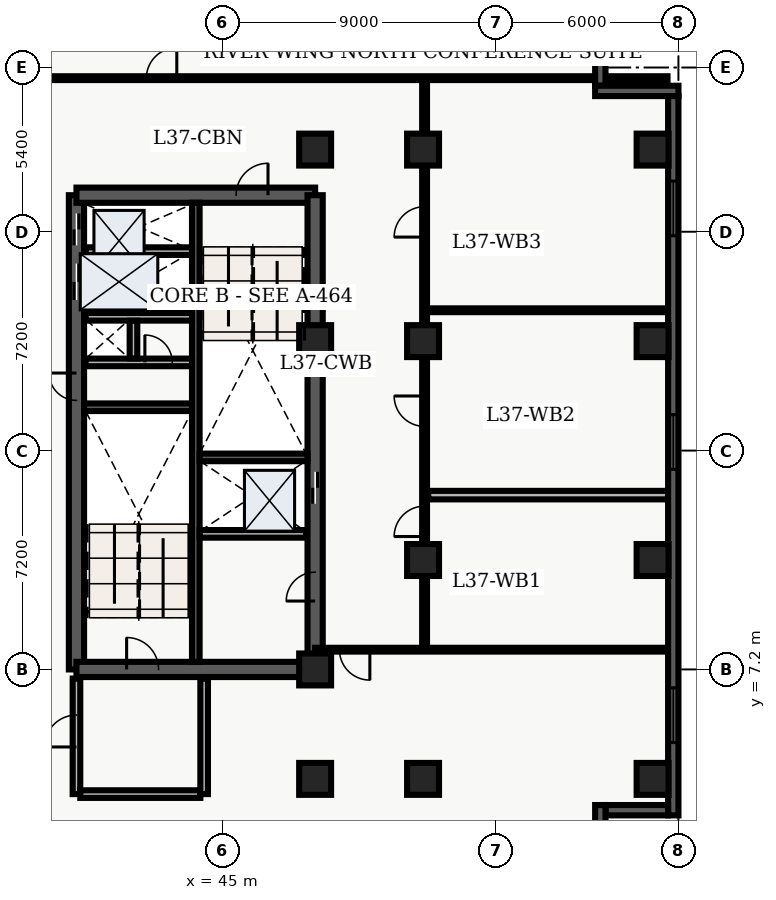
"""IFC4 building model, lengths in metres.
Left out: names, types, materials, properties, quantities, classifications, styles, units other than length and angle.
Written with IfcOpenShell. Run it as: python <this file> out.ifc"""

import sys

from ifc_helpers import new_model, entity, si_unit, converted_unit, direction, frame, origin_with_axes, origin_2d_with_axis, place, context, subcontext, project, spatial, polyline, rectangle, outline, extrude, element, fill, save


model = new_model("IFC4")
c1 = context("Model", 3, precision=1e-05, world=origin_with_axes(), true_north=direction((0.0, 1.0)))
c2 = subcontext(c1, "Body", "Model", "MODEL_VIEW")
j1 = project(units=[si_unit("LENGTHUNIT", "METRE"), converted_unit("PLANEANGLEUNIT", "DEGREE", entity("IfcPlaneAngleMeasure", 0.017), si_unit("PLANEANGLEUNIT", "RADIAN"), dimensions=[0, 0, 0, 0, 0, 0, 0])], contexts=[c1])
p1 = place(None, origin_with_axes())
s1 = spatial("IfcSite", under=j1, at=p1, CompositionType="ELEMENT")
p2 = place(p1, origin_with_axes())
s2 = spatial("IfcBuilding", under=s1, at=p2, CompositionType="ELEMENT")
p3 = place(p2, frame((0.0, 0.0, 152.4), z_axis=(0.0, 0.0, 1.0), x_axis=(1.0, 0.0, 0.0)))
s3 = spatial("IfcBuildingStorey", under=s2, at=p3, CompositionType="ELEMENT", Elevation=152.4)
p4 = place(p3, frame((40.2, 7.2, 0.0), z_axis=(0.0, 0.0, 1.0), x_axis=(0.0, 1.0, 0.0)))
e1 = element("IfcWall", 1, at=p4, inside=s3, PredefinedType="SHEAR", context=c2, shape_type="SweptSolid", body=[
    extrude(outline(polyline([(0.0, -0.25), (15.6, -0.25), (15.6, 0.25), (0.0, 0.25), (0.0, -0.25)])), origin_with_axes(), (0.0, 0.0, 1.0), 3.66),
])
p5 = place(p4, frame((14.475, 0.0, 0.0), z_axis=(0.0, 0.0, 1.0), x_axis=(1.0, 0.0, 0.0)))
e2 = element("IfcOpeningElement", 2, at=p5, cuts=e1, PredefinedType="OPENING", context=c2, shape_type="SweptSolid", body=[
    extrude(rectangle(XDim=1.05, YDim=0.52, at=origin_2d_with_axis()), origin_with_axes(), (0.0, 0.0, 1.0), 2.15),
])
p6 = place(p4, frame((12.75, 0.0, 0.0), z_axis=(0.0, 0.0, 1.0), x_axis=(1.0, 0.0, 0.0)))
e3 = element("IfcOpeningElement", 3, at=p6, cuts=e1, PredefinedType="OPENING", context=c2, shape_type="SweptSolid", body=[
    extrude(rectangle(XDim=1.2, YDim=0.52, at=origin_2d_with_axis()), origin_with_axes(), (0.0, 0.0, 1.0), 2.15),
])
p7 = place(p4, frame((9.3, 0.0, 0.0), z_axis=(0.0, 0.0, 1.0), x_axis=(1.0, 0.0, 0.0)))
e4 = element("IfcOpeningElement", 4, at=p7, cuts=e1, PredefinedType="OPENING", context=c2, shape_type="SweptSolid", body=[
    extrude(rectangle(XDim=0.9, YDim=0.52, at=origin_2d_with_axis()), origin_with_axes(), (0.0, 0.0, 1.0), 2.15),
])
p8 = place(p3, frame((40.2, 7.2, 0.0), z_axis=(0.0, 0.0, 1.0), x_axis=(1.0, 0.0, 0.0)))
e5 = element("IfcWall", 5, at=p8, inside=s3, PredefinedType="SHEAR", context=c2, shape_type="SweptSolid", body=[
    extrude(outline(polyline([(0.0, -0.25), (7.85, -0.25), (7.85, 0.25), (0.0, 0.25), (0.0, -0.25)])), origin_with_axes(), (0.0, 0.0, 1.0), 3.66),
])
p9 = place(p8, frame((2.175, 0.0, 0.0), z_axis=(0.0, 0.0, 1.0), x_axis=(1.0, 0.0, 0.0)))
e6 = element("IfcOpeningElement", 6, at=p9, cuts=e5, PredefinedType="OPENING", context=c2, shape_type="SweptSolid", body=[
    extrude(rectangle(XDim=1.05, YDim=0.52, at=origin_2d_with_axis()), origin_with_axes(), (0.0, 0.0, 1.0), 2.15),
])
p10 = place(p3, frame((40.2, 22.8, 0.0), z_axis=(0.0, 0.0, 1.0), x_axis=(1.0, 0.0, 0.0)))
e7 = element("IfcWall", 7, at=p10, inside=s3, PredefinedType="SHEAR", context=c2, shape_type="SweptSolid", body=[
    extrude(outline(polyline([(0.0, -0.25), (7.85, -0.25), (7.85, 0.25), (0.0, 0.25), (0.0, -0.25)])), origin_with_axes(), (0.0, 0.0, 1.0), 3.66),
])
p11 = place(p10, frame((5.775, 0.0, 0.0), z_axis=(0.0, 0.0, 1.0), x_axis=(1.0, 0.0, 0.0)))
e8 = element("IfcOpeningElement", 8, at=p11, cuts=e7, PredefinedType="OPENING", context=c2, shape_type="SweptSolid", body=[
    extrude(rectangle(XDim=1.05, YDim=0.52, at=origin_2d_with_axis()), origin_with_axes(), (0.0, 0.0, 1.0), 2.15),
])
p12 = place(p3, frame((48.05, 7.2, 0.0), z_axis=(0.0, 0.0, 1.0), x_axis=(0.0, 1.0, 0.0)))
e9 = element("IfcWall", 9, at=p12, inside=s3, PredefinedType="SHEAR", context=c2, shape_type="SweptSolid", body=[
    extrude(outline(polyline([(0.0, -0.25), (15.6, -0.25), (15.6, 0.25), (0.0, 0.25), (0.0, -0.25)])), origin_with_axes(), (0.0, 0.0, 1.0), 3.66),
])
p13 = place(p12, frame((5.975, 0.0, 0.0), z_axis=(0.0, 0.0, 1.0), x_axis=(1.0, 0.0, 0.0)))
e10 = element("IfcOpeningElement", 10, at=p13, cuts=e9, PredefinedType="OPENING", context=c2, shape_type="SweptSolid", body=[
    extrude(rectangle(XDim=1.05, YDim=0.52, at=origin_2d_with_axis()), origin_with_axes(), (0.0, 0.0, 1.0), 2.15),
])
p14 = place(p12, frame((2.725, 0.0, 0.0), z_axis=(0.0, 0.0, 1.0), x_axis=(1.0, 0.0, 0.0)))
e11 = element("IfcOpeningElement", 11, at=p14, cuts=e9, PredefinedType="OPENING", context=c2, shape_type="SweptSolid", body=[
    extrude(rectangle(XDim=0.95, YDim=0.52, at=origin_2d_with_axis()), origin_with_axes(), (0.0, 0.0, 1.0), 2.15),
])
p15 = place(p3, frame((44.125, 7.45, 0.0), z_axis=(0.0, 0.0, 1.0), x_axis=(0.0, 1.0, 0.0)))
e12 = element("IfcWall", 12, at=p15, inside=s3, PredefinedType="SHEAR", context=c2, shape_type="SweptSolid", body=[
    extrude(outline(polyline([(0.0, -0.125), (15.1, -0.125), (15.1, 0.125), (0.0, 0.125), (0.0, -0.125)])), origin_with_axes(), (0.0, 0.0, 1.0), 3.66),
])
for number, where, z_axis, x_axis in (
    (13, (40.45, 15.825, 0.0), (0.0, 0.0, 1.0), (1.0, 0.0, 0.0)),
    (14, (44.25, 14.175, 0.0), (0.0, 0.0, 1.0), (1.0, 0.0, 0.0)),
):
    element("IfcWall", number, at=place(p3, frame(where, z_axis=z_axis, x_axis=x_axis)), inside=s3, PredefinedType="SHEAR", context=c2, shape_type="SweptSolid", body=[
        extrude(outline(polyline([(0.0, -0.125), (3.55, -0.125), (3.55, 0.125), (0.0, 0.125), (0.0, -0.125)])), origin_with_axes(), (0.0, 0.0, 1.0), 3.66),
    ])
p16 = place(p3, frame((40.5, 17.3, 0.0), z_axis=(0.0, 0.0, 1.0), x_axis=(1.0, 0.0, 0.0)))
e15 = element("IfcWall", 15, at=p16, inside=s3, PredefinedType="SOLIDWALL", context=c2, shape_type="SweptSolid", body=[
    extrude(outline(polyline([(0.0, -0.125), (3.5, -0.125), (3.5, 0.125), (0.0, 0.125), (0.0, -0.125)])), origin_with_axes(), (0.0, 0.0, 1.0), 2.7),
])
p17 = place(p16, frame((2.4, 0.0, 0.0), z_axis=(0.0, 0.0, 1.0), x_axis=(1.0, 0.0, 0.0)))
e16 = element("IfcOpeningElement", 16, at=p17, cuts=e15, PredefinedType="OPENING", context=c2, shape_type="SweptSolid", body=[
    extrude(rectangle(XDim=0.9, YDim=0.27, at=origin_2d_with_axis()), origin_with_axes(), (0.0, 0.0, 1.0), 2.15),
])
p18 = place(p3, frame((40.5, 18.8, 0.0), z_axis=(0.0, 0.0, 1.0), x_axis=(1.0, 0.0, 0.0)))
e17 = element("IfcWall", 17, at=p18, inside=s3, PredefinedType="SOLIDWALL", context=c2, shape_type="SweptSolid", body=[
    extrude(outline(polyline([(0.0, -0.125), (3.5, -0.125), (3.5, 0.125), (0.0, 0.125), (0.0, -0.125)])), origin_with_axes(), (0.0, 0.0, 1.0), 2.7),
])
p19 = place(p3, frame((42.075, 17.43, 0.0), z_axis=(0.0, 0.0, 1.0), x_axis=(0.0, 1.0, 0.0)))
e18 = element("IfcWall", 18, at=p19, inside=s3, PredefinedType="SOLIDWALL", context=c2, shape_type="SweptSolid", body=[
    extrude(outline(polyline([(0.0, -0.125), (1.24, -0.125), (1.24, 0.125), (0.0, 0.125), (0.0, -0.125)])), origin_with_axes(), (0.0, 0.0, 1.0), 2.7),
])
p20 = place(p3, frame((40.2, 3.1, 0.0), z_axis=(0.0, 0.0, 1.0), x_axis=(0.0, 1.0, 0.0)))
e19 = element("IfcWall", 19, at=p20, inside=s3, PredefinedType="SOLIDWALL", context=c2, shape_type="SweptSolid", body=[
    extrude(outline(polyline([(0.0, -0.125), (3.8, -0.125), (3.8, 0.125), (0.0, 0.125), (0.0, -0.125)])), origin_with_axes(), (0.0, 0.0, 1.0), 2.7),
])
p21 = place(p20, frame((2.075, 0.0, 0.0), z_axis=(0.0, 0.0, 1.0), x_axis=(1.0, 0.0, 0.0)))
e20 = element("IfcOpeningElement", 20, at=p21, cuts=e19, PredefinedType="OPENING", context=c2, shape_type="SweptSolid", body=[
    extrude(rectangle(XDim=1.05, YDim=0.27, at=origin_2d_with_axis()), origin_with_axes(), (0.0, 0.0, 1.0), 2.15),
])
p22 = place(p3, frame((40.325, 3.1, 0.0), z_axis=(0.0, 0.0, 1.0), x_axis=(1.0, 0.0, 0.0)))
e21 = element("IfcWall", 21, at=p22, inside=s3, PredefinedType="SOLIDWALL", context=c2, shape_type="SweptSolid", body=[
    extrude(outline(polyline([(0.0, -0.125), (3.95, -0.125), (3.95, 0.125), (0.0, 0.125), (0.0, -0.125)])), origin_with_axes(), (0.0, 0.0, 1.0), 2.7),
])
p23 = place(p3, frame((44.4, 3.1, 0.0), z_axis=(0.0, 0.0, 1.0), x_axis=(0.0, 1.0, 0.0)))
e22 = element("IfcWall", 22, at=p23, inside=s3, PredefinedType="SOLIDWALL", context=c2, shape_type="SweptSolid", body=[
    extrude(outline(polyline([(0.0, -0.125), (3.8, -0.125), (3.8, 0.125), (0.0, 0.125), (0.0, -0.125)])), origin_with_axes(), (0.0, 0.0, 1.0), 2.7),
])
for number, where, z_axis, x_axis in (
    (23, (48.05, 3.6, 0.0), (0.0, 0.0, 1.0), (1.0, 0.0, 0.0)),
    (24, (48.05, 7.2, 0.0), (0.0, 0.0, 1.0), (1.0, 0.0, 0.0)),
    (25, (48.05, 18.0, 0.0), (0.0, 0.0, 1.0), (1.0, 0.0, 0.0)),
    (26, (48.05, 24.3, 0.0), (0.0, 0.0, 1.0), (1.0, 0.0, 0.0)),
    (27, (51.6, 3.6, 0.0), (0.0, 0.0, 1.0), (1.0, 0.0, 0.0)),
    (28, (51.6, 10.8, 0.0), (0.0, 0.0, 1.0), (1.0, 0.0, 0.0)),
    (29, (51.6, 18.0, 0.0), (0.0, 0.0, 1.0), (1.0, 0.0, 0.0)),
    (30, (51.6, 24.3, 0.0), (0.0, 0.0, 1.0), (1.0, 0.0, 0.0)),
    (31, (59.15, 3.6, 0.0), (0.0, 0.0, 1.0), (1.0, 0.0, 0.0)),
    (32, (59.15, 10.8, 0.0), (0.0, 0.0, 1.0), (1.0, 0.0, 0.0)),
    (33, (59.15, 18.0, 0.0), (0.0, 0.0, 1.0), (1.0, 0.0, 0.0)),
    (34, (59.15, 24.3, 0.0), (0.0, 0.0, 1.0), (1.0, 0.0, 0.0)),
):
    element("IfcColumn", number, at=place(p3, frame(where, z_axis=z_axis, x_axis=x_axis)), inside=s3, PredefinedType="COLUMN", context=c2, shape_type="SweptSolid", body=[
        extrude(rectangle(XDim=1.05, YDim=1.05, at=origin_2d_with_axis()), origin_with_axes(), (0.0, 0.0, 1.0), 3.9),
    ])
for number, where, z_axis, x_axis in (
    (35, (40.5, 20.96, 0.0), (0.0, 0.0, 1.0), (1.0, 0.0, 0.0)),
    (36, (44.25, 11.66, 0.0), (0.0, 0.0, 1.0), (1.0, 0.0, 0.0)),
):
    element("IfcWall", number, at=place(p3, frame(where, z_axis=z_axis, x_axis=x_axis)), inside=s3, PredefinedType="SOLIDWALL", context=c2, shape_type="SweptSolid", body=[
        extrude(outline(polyline([(0.0, -0.125), (3.5, -0.125), (3.5, 0.125), (0.0, 0.125), (0.0, -0.125)])), origin_with_axes(), (0.0, 0.0, 1.0), 2.7),
    ])
p24 = place(p3, frame((51.65, 7.85, 0.0), z_axis=(0.0, 0.0, 1.0), x_axis=(0.0, 1.0, 0.0)))
e37 = element("IfcWall", 37, at=p24, inside=s3, PredefinedType="PARTITIONING", context=c2, shape_type="SweptSolid", body=[
    extrude(outline(polyline([(0.0, -0.08), (18.8, -0.08), (18.8, 0.08), (0.0, 0.08), (0.0, -0.08)])), origin_with_axes(), (0.0, 0.0, 1.0), 2.7),
])
p25 = place(p24, frame((4.222, 0.0, 0.0), z_axis=(0.0, 0.0, 1.0), x_axis=(1.0, 0.0, 0.0)))
e38 = element("IfcOpeningElement", 38, at=p25, cuts=e37, PredefinedType="OPENING", context=c2, shape_type="SweptSolid", body=[
    extrude(rectangle(XDim=1.0, YDim=0.18, at=origin_2d_with_axis()), origin_with_axes(), (0.0, 0.0, 1.0), 2.15),
])
p26 = place(p24, frame((7.845, 0.0, 0.0), z_axis=(0.0, 0.0, 1.0), x_axis=(1.0, 0.0, 0.0)))
e39 = element("IfcOpeningElement", 39, at=p26, cuts=e37, PredefinedType="OPENING", context=c2, shape_type="SweptSolid", body=[
    extrude(rectangle(XDim=1.0, YDim=0.18, at=origin_2d_with_axis()), origin_with_axes(), (0.0, 0.0, 1.0), 2.15),
])
p27 = place(p24, frame((14.072, 0.0, 0.0), z_axis=(0.0, 0.0, 1.0), x_axis=(1.0, 0.0, 0.0)))
e40 = element("IfcOpeningElement", 40, at=p27, cuts=e37, PredefinedType="OPENING", context=c2, shape_type="SweptSolid", body=[
    extrude(rectangle(XDim=1.0, YDim=0.18, at=origin_2d_with_axis()), origin_with_axes(), (0.0, 0.0, 1.0), 2.15),
])
p28 = place(p3, frame((59.665, 7.85, 0.0), z_axis=(0.0, 0.0, 1.0), x_axis=(-1.0, 0.0, 0.0)))
e41 = element("IfcWall", 41, at=p28, inside=s3, PredefinedType="PARTITIONING", context=c2, shape_type="SweptSolid", body=[
    extrude(outline(polyline([(0.0, -0.062), (11.615, -0.062), (11.615, 0.062), (0.0, 0.062), (0.0, -0.062)])), origin_with_axes(), (0.0, 0.0, 1.0), 2.7),
])
p29 = place(p28, frame((10.315, 0.0, 0.0), z_axis=(0.0, 0.0, 1.0), x_axis=(1.0, 0.0, 0.0)))
e42 = element("IfcOpeningElement", 42, at=p29, cuts=e41, PredefinedType="OPENING", context=c2, shape_type="SweptSolid", body=[
    extrude(rectangle(XDim=1.0, YDim=0.145, at=origin_2d_with_axis()), origin_with_axes(), (0.0, 0.0, 1.0), 2.15),
])
p30 = place(p3, frame((38.735, 26.65, 0.0), z_axis=(0.0, 0.0, 1.0), x_axis=(1.0, 0.0, 0.0)))
e43 = element("IfcWall", 43, at=p30, inside=s3, PredefinedType="PARTITIONING", context=c2, shape_type="SweptSolid", body=[
    extrude(outline(polyline([(0.0, -0.062), (20.905, -0.062), (20.905, 0.062), (0.0, 0.062), (0.0, -0.062)])), origin_with_axes(), (0.0, 0.0, 1.0), 2.7),
])
p31 = place(p30, frame((4.265, 0.0, 0.0), z_axis=(0.0, 0.0, 1.0), x_axis=(1.0, 0.0, 0.0)))
e44 = element("IfcOpeningElement", 44, at=p31, cuts=e43, PredefinedType="OPENING", context=c2, shape_type="SweptSolid", body=[
    extrude(rectangle(XDim=1.0, YDim=0.145, at=origin_2d_with_axis()), origin_with_axes(), (0.0, 0.0, 1.0), 2.15),
])
p32 = place(p3, frame((51.77, 12.934, 0.0), z_axis=(0.0, 0.0, 1.0), x_axis=(1.0, 0.0, 0.0)))
e45 = element("IfcWall", 45, at=p32, inside=s3, PredefinedType="PARTITIONING", context=c2, shape_type="SweptSolid", body=[
    extrude(outline(polyline([(0.0, -0.14), (7.895, -0.14), (7.895, 0.14), (0.0, 0.14), (0.0, -0.14)])), origin_with_axes(), (0.0, 0.0, 1.0), 2.7),
])
p33 = place(p3, frame((51.77, 19.015, 0.0), z_axis=(0.0, 0.0, 1.0), x_axis=(1.0, 0.0, 0.0)))
e46 = element("IfcWall", 46, at=p33, inside=s3, PredefinedType="PARTITIONING", context=c2, shape_type="SweptSolid", body=[
    extrude(outline(polyline([(0.0, -0.062), (7.895, -0.062), (7.895, 0.062), (0.0, 0.062), (0.0, -0.062)])), origin_with_axes(), (0.0, 0.0, 1.0), 2.7),
])
p34 = place(p3, frame((57.43, 28.46, 0.0), z_axis=(0.0, 0.0, 1.0), x_axis=(0.0, -1.0, 0.0)))
e47 = element("IfcWall", 47, at=p34, inside=s3, PredefinedType="SOLIDWALL", context=c2, shape_type="SweptSolid", body=[
    extrude(outline(polyline([(0.0, -0.17), (2.06, -0.17), (2.06, 0.17), (0.0, 0.17), (0.0, -0.17)])), origin_with_axes(), (0.0, 0.0, 1.0), 3.66),
])
p35 = place(p3, frame((57.26, 26.23, 0.0), z_axis=(0.0, 0.0, 1.0), x_axis=(1.0, 0.0, 0.0)))
e48 = element("IfcWall", 48, at=p35, inside=s3, PredefinedType="SOLIDWALL", context=c2, shape_type="SweptSolid", body=[
    extrude(outline(polyline([(0.0, -0.17), (2.74, -0.17), (2.74, 0.17), (0.0, 0.17), (0.0, -0.17)])), origin_with_axes(), (0.0, 0.0, 1.0), 3.66),
])
p36 = place(p3, frame((59.83, 26.06, 0.0), z_axis=(0.0, 0.0, 1.0), x_axis=(0.0, -1.0, 0.0)))
e49 = element("IfcWall", 49, at=p36, inside=s3, PredefinedType="SOLIDWALL", context=c2, shape_type="SweptSolid", body=[
    extrude(outline(polyline([(0.0, -0.17), (23.66, -0.17), (23.66, 0.17), (0.0, 0.17), (0.0, -0.17)])), origin_with_axes(), (0.0, 0.0, 1.0), 3.66),
])
p37 = place(p36, frame((3.696, 0.0, 0.45), z_axis=(0.0, 0.0, 1.0), x_axis=(1.0, 0.0, 0.0)))
e50 = element("IfcOpeningElement", 50, at=p37, cuts=e49, PredefinedType="OPENING", context=c2, shape_type="SweptSolid", body=[
    extrude(rectangle(XDim=1.8, YDim=0.36, at=origin_2d_with_axis()), origin_with_axes(), (0.0, 0.0, 1.0), 2.1),
])
p38 = place(p36, frame((11.38, 0.0, 0.45), z_axis=(0.0, 0.0, 1.0), x_axis=(1.0, 0.0, 0.0)))
e51 = element("IfcOpeningElement", 51, at=p38, cuts=e49, PredefinedType="OPENING", context=c2, shape_type="SweptSolid", body=[
    extrude(rectangle(XDim=1.8, YDim=0.36, at=origin_2d_with_axis()), origin_with_axes(), (0.0, 0.0, 1.0), 2.1),
])
p39 = place(p36, frame((20.364, 0.0, 0.45), z_axis=(0.0, 0.0, 1.0), x_axis=(1.0, 0.0, 0.0)))
e52 = element("IfcOpeningElement", 52, at=p39, cuts=e49, PredefinedType="OPENING", context=c2, shape_type="SweptSolid", body=[
    extrude(rectangle(XDim=1.8, YDim=0.36, at=origin_2d_with_axis()), origin_with_axes(), (0.0, 0.0, 1.0), 2.1),
])
p40 = place(p3, frame((59.66, 2.57, 0.0), z_axis=(0.0, 0.0, 1.0), x_axis=(-1.0, 0.0, 0.0)))
e53 = element("IfcWall", 53, at=p40, inside=s3, PredefinedType="SOLIDWALL", context=c2, shape_type="SweptSolid", body=[
    extrude(outline(polyline([(0.0, -0.17), (2.06, -0.17), (2.06, 0.17), (0.0, 0.17), (0.0, -0.17)])), origin_with_axes(), (0.0, 0.0, 1.0), 3.66),
])
p41 = place(p3, frame((57.43, 2.74, 0.0), z_axis=(0.0, 0.0, 1.0), x_axis=(0.0, -1.0, 0.0)))
e54 = element("IfcWall", 54, at=p41, inside=s3, PredefinedType="SOLIDWALL", context=c2, shape_type="SweptSolid", body=[
    extrude(outline(polyline([(0.0, -0.17), (2.74, -0.17), (2.74, 0.17), (0.0, 0.17), (0.0, -0.17)])), origin_with_axes(), (0.0, 0.0, 1.0), 3.66),
])
p42 = place(p12, frame((5.975, 0.0, 0.0), z_axis=(0.0, 0.0, 1.0), x_axis=(1.0, 0.0, 0.0)))
e55 = element("IfcDoor", 55, at=p42, inside=s3, OperationType="SLIDING_TO_LEFT", PredefinedType="DOOR", context=c2, shape_type="SweptSolid", body=[
    extrude(rectangle(XDim=1.05, YDim=0.09, at=origin_2d_with_axis()), origin_with_axes(), (0.0, 0.0, 1.0), 2.15),
])
fill(e10, e55)
p43 = place(p4, frame((14.475, 0.0, 0.0), z_axis=(0.0, 0.0, 1.0), x_axis=(1.0, 0.0, 0.0)))
e56 = element("IfcDoor", 56, at=p43, inside=s3, OperationType="SLIDING_TO_RIGHT", PredefinedType="DOOR", context=c2, shape_type="SweptSolid", body=[
    extrude(rectangle(XDim=1.05, YDim=0.09, at=origin_2d_with_axis()), origin_with_axes(), (0.0, 0.0, 1.0), 2.15),
])
fill(e2, e56)
p44 = place(p4, frame((12.75, 0.0, 0.0), z_axis=(0.0, 0.0, 1.0), x_axis=(1.0, 0.0, 0.0)))
e57 = element("IfcDoor", 57, at=p44, inside=s3, OperationType="DOUBLE_DOOR_SLIDING", PredefinedType="DOOR", context=c2, shape_type="SweptSolid", body=[
    extrude(rectangle(XDim=1.2, YDim=0.09, at=origin_2d_with_axis()), origin_with_axes(), (0.0, 0.0, 1.0), 2.15),
])
fill(e3, e57)
p45 = place(p4, frame((9.3, 0.0, 0.0), z_axis=(0.0, 0.0, 1.0), x_axis=(1.0, 0.0, 0.0)))
e58 = element("IfcDoor", 58, at=p45, inside=s3, OperationType="SINGLE_SWING_RIGHT", PredefinedType="DOOR", context=c2, shape_type="SweptSolid", body=[
    extrude(rectangle(XDim=0.9, YDim=0.09, at=origin_2d_with_axis()), origin_with_axes(), (0.0, 0.0, 1.0), 2.15),
])
fill(e4, e58)
p46 = place(p16, frame((2.4, 0.0, 0.0), z_axis=(0.0, 0.0, 1.0), x_axis=(1.0, 0.0, 0.0)))
e59 = element("IfcDoor", 59, at=p46, inside=s3, OperationType="SINGLE_SWING_LEFT", PredefinedType="DOOR", context=c2, shape_type="SweptSolid", body=[
    extrude(rectangle(XDim=0.9, YDim=0.09, at=origin_2d_with_axis()), origin_with_axes(), (0.0, 0.0, 1.0), 2.15),
])
fill(e16, e59)
p47 = place(p8, frame((2.175, 0.0, 0.0), z_axis=(0.0, 0.0, 1.0), x_axis=(1.0, 0.0, 0.0)))
e60 = element("IfcDoor", 60, at=p47, inside=s3, OperationType="SINGLE_SWING_LEFT", PredefinedType="DOOR", context=c2, shape_type="SweptSolid", body=[
    extrude(rectangle(XDim=1.05, YDim=0.09, at=origin_2d_with_axis()), origin_with_axes(), (0.0, 0.0, 1.0), 2.15),
])
fill(e6, e60)
p48 = place(p10, frame((5.775, 0.0, 0.0), z_axis=(0.0, 0.0, 1.0), x_axis=(1.0, 0.0, 0.0)))
e61 = element("IfcDoor", 61, at=p48, inside=s3, OperationType="SINGLE_SWING_RIGHT", PredefinedType="DOOR", context=c2, shape_type="SweptSolid", body=[
    extrude(rectangle(XDim=1.05, YDim=0.09, at=origin_2d_with_axis()), origin_with_axes(), (0.0, 0.0, 1.0), 2.15),
])
fill(e8, e61)
p49 = place(p20, frame((2.075, 0.0, 0.0), z_axis=(0.0, 0.0, 1.0), x_axis=(1.0, 0.0, 0.0)))
e62 = element("IfcDoor", 62, at=p49, inside=s3, OperationType="SINGLE_SWING_LEFT", PredefinedType="DOOR", context=c2, shape_type="SweptSolid", body=[
    extrude(rectangle(XDim=1.05, YDim=0.09, at=origin_2d_with_axis()), origin_with_axes(), (0.0, 0.0, 1.0), 2.15),
])
fill(e20, e62)
p50 = place(p12, frame((2.725, 0.0, 0.0), z_axis=(0.0, 0.0, 1.0), x_axis=(1.0, 0.0, 0.0)))
e63 = element("IfcDoor", 63, at=p50, inside=s3, OperationType="SINGLE_SWING_LEFT", PredefinedType="DOOR", context=c2, shape_type="SweptSolid", body=[
    extrude(rectangle(XDim=0.95, YDim=0.09, at=origin_2d_with_axis()), origin_with_axes(), (0.0, 0.0, 1.0), 2.15),
])
fill(e11, e63)
p51 = place(p28, frame((10.315, 0.0, 0.0), z_axis=(0.0, 0.0, 1.0), x_axis=(1.0, 0.0, 0.0)))
e64 = element("IfcDoor", 64, at=p51, inside=s3, OperationType="SINGLE_SWING_LEFT", PredefinedType="DOOR", context=c2, shape_type="SweptSolid", body=[
    extrude(rectangle(XDim=1.0, YDim=0.075, at=origin_2d_with_axis()), origin_with_axes(), (0.0, 0.0, 1.0), 2.15),
])
fill(e42, e64)
p52 = place(p30, frame((4.265, 0.0, 0.0), z_axis=(0.0, 0.0, 1.0), x_axis=(1.0, 0.0, 0.0)))
e65 = element("IfcDoor", 65, at=p52, inside=s3, OperationType="SINGLE_SWING_RIGHT", PredefinedType="DOOR", context=c2, shape_type="SweptSolid", body=[
    extrude(rectangle(XDim=1.0, YDim=0.075, at=origin_2d_with_axis()), origin_with_axes(), (0.0, 0.0, 1.0), 2.15),
])
fill(e44, e65)
p53 = place(p24, frame((4.222, 0.0, 0.0), z_axis=(0.0, 0.0, 1.0), x_axis=(1.0, 0.0, 0.0)))
e66 = element("IfcDoor", 66, at=p53, inside=s3, OperationType="SINGLE_SWING_LEFT", PredefinedType="DOOR", context=c2, shape_type="SweptSolid", body=[
    extrude(rectangle(XDim=1.0, YDim=0.09, at=origin_2d_with_axis()), origin_with_axes(), (0.0, 0.0, 1.0), 2.15),
])
fill(e38, e66)
p54 = place(p24, frame((7.845, 0.0, 0.0), z_axis=(0.0, 0.0, 1.0), x_axis=(1.0, 0.0, 0.0)))
e67 = element("IfcDoor", 67, at=p54, inside=s3, OperationType="SINGLE_SWING_RIGHT", PredefinedType="DOOR", context=c2, shape_type="SweptSolid", body=[
    extrude(rectangle(XDim=1.0, YDim=0.09, at=origin_2d_with_axis()), origin_with_axes(), (0.0, 0.0, 1.0), 2.15),
])
fill(e39, e67)
p55 = place(p24, frame((14.072, 0.0, 0.0), z_axis=(0.0, 0.0, 1.0), x_axis=(1.0, 0.0, 0.0)))
e68 = element("IfcDoor", 68, at=p55, inside=s3, OperationType="SINGLE_SWING_LEFT", PredefinedType="DOOR", context=c2, shape_type="SweptSolid", body=[
    extrude(rectangle(XDim=1.0, YDim=0.09, at=origin_2d_with_axis()), origin_with_axes(), (0.0, 0.0, 1.0), 2.15),
])
fill(e40, e68)
p56 = place(p36, frame((3.696, 0.0, 0.45), z_axis=(0.0, 0.0, 1.0), x_axis=(1.0, 0.0, 0.0)))
e69 = element("IfcWindow", 69, at=p56, inside=s3, PredefinedType="WINDOW", context=c2, shape_type="SweptSolid", body=[
    extrude(rectangle(XDim=1.8, YDim=0.09, at=origin_2d_with_axis()), origin_with_axes(), (0.0, 0.0, 1.0), 2.1),
])
fill(e50, e69)
p57 = place(p36, frame((11.38, 0.0, 0.45), z_axis=(0.0, 0.0, 1.0), x_axis=(1.0, 0.0, 0.0)))
e70 = element("IfcWindow", 70, at=p57, inside=s3, PredefinedType="WINDOW", context=c2, shape_type="SweptSolid", body=[
    extrude(rectangle(XDim=1.8, YDim=0.09, at=origin_2d_with_axis()), origin_with_axes(), (0.0, 0.0, 1.0), 2.1),
])
fill(e51, e70)
p58 = place(p36, frame((20.364, 0.0, 0.45), z_axis=(0.0, 0.0, 1.0), x_axis=(1.0, 0.0, 0.0)))
e71 = element("IfcWindow", 71, at=p58, inside=s3, PredefinedType="WINDOW", context=c2, shape_type="SweptSolid", body=[
    extrude(rectangle(XDim=1.8, YDim=0.09, at=origin_2d_with_axis()), origin_with_axes(), (0.0, 0.0, 1.0), 2.1),
])
fill(e52, e71)
save(model, sys.argv[1])
